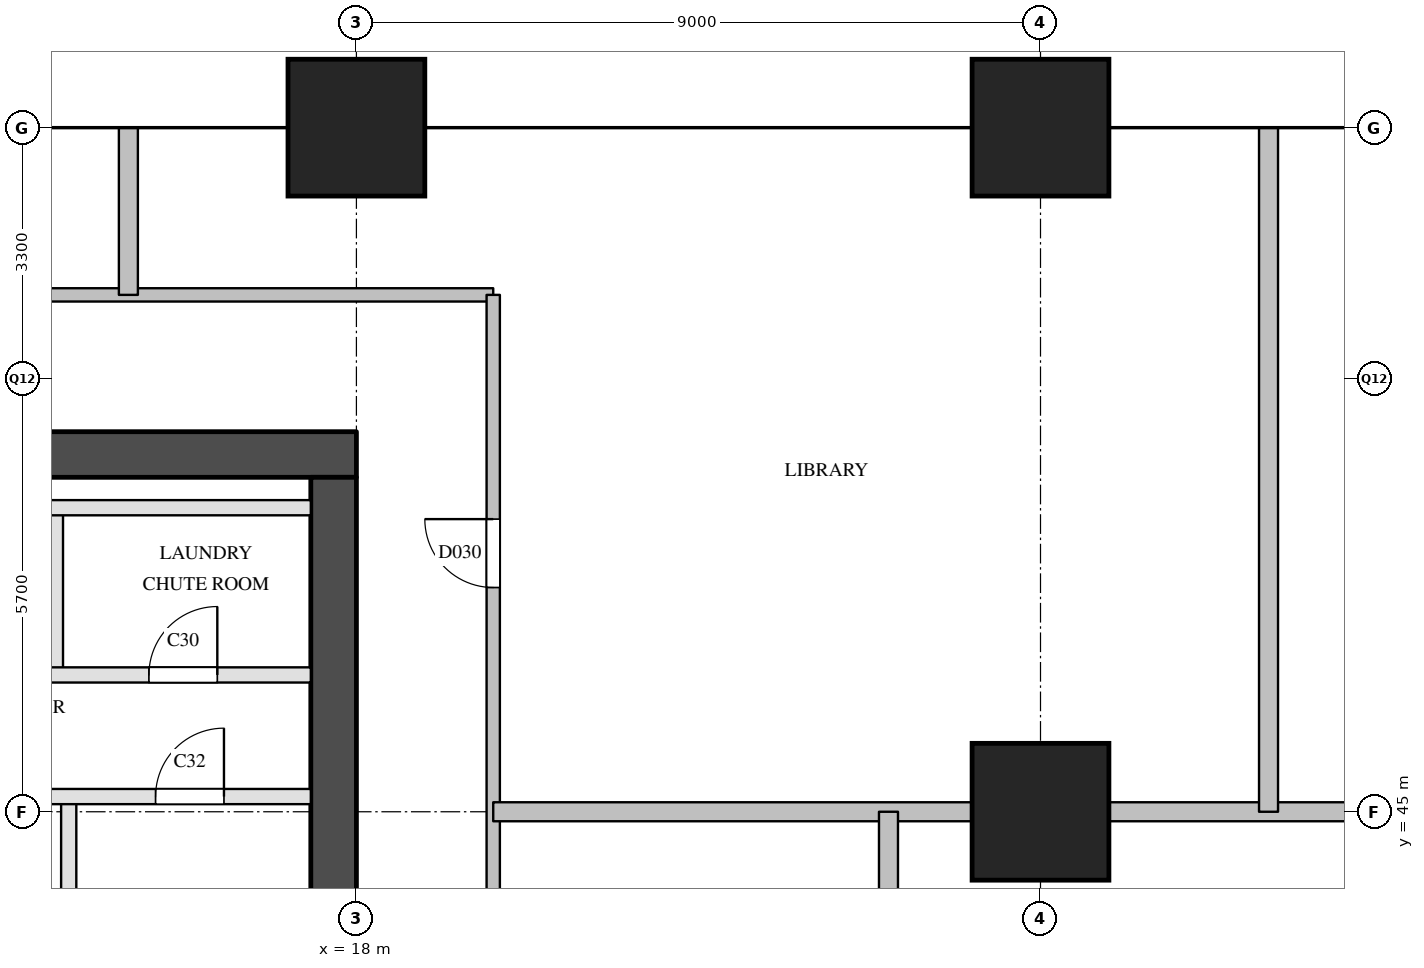
"""IFC4 building model, lengths in metres.
Left out: names, types, materials, properties, quantities, classifications, styles, units other than length and angle.
Written with IfcOpenShell. Run it as: python <this file> out.ifc"""

import sys

from ifc_helpers import new_model, si_unit, direction, frame, frame_2d, origin, origin_2d, place, context, subcontext, project, spatial, rectangle, extrude, element, fill, save


model = new_model("IFC4")
c1 = context("Model", 3, precision=1e-05, world=origin(), true_north=direction((0.0, 1.0)))
c2 = subcontext(c1, "Body", "Model", "MODEL_VIEW")
j1 = project(units=[si_unit("LENGTHUNIT", "METRE"), si_unit("PLANEANGLEUNIT", "RADIAN")], contexts=[c1])
p1 = place(None, origin())
s1 = spatial("IfcSite", under=j1, at=p1, CompositionType="ELEMENT")
p2 = place(p1, origin())
s2 = spatial("IfcBuilding", under=s1, at=p2, CompositionType="ELEMENT")
p3 = place(p2, frame((0.0, 0.0, 119.6)))
s3 = spatial("IfcBuildingStorey", under=s2, at=p3, CompositionType="ELEMENT", Elevation=119.6)
for number, where, z_axis, x_axis in (
    (1, (18.0, 54.0, 0.0), (0.0, 0.0, 1.0), (1.0, 0.0, 0.0)),
    (2, (27.0, 45.0, 0.0), (0.0, 0.0, 1.0), (1.0, 0.0, 0.0)),
    (3, (27.0, 54.0, 0.0), (0.0, 0.0, 1.0), (1.0, 0.0, 0.0)),
):
    element("IfcColumn", number, at=place(p3, frame(where, z_axis=z_axis, x_axis=x_axis)), inside=s3, PredefinedType="COLUMN", context=c2, shape_type="SweptSolid", body=[
        extrude(rectangle(XDim=1.8, YDim=1.8, at=origin_2d()), origin(), (0.0, 0.0, 1.0), 3.8),
    ])
p4 = place(p3, frame((5.6, 49.7, 0.0), z_axis=(0.0, 0.0, 1.0), x_axis=(1.0, 0.0, 0.0)))
e4 = element("IfcWall", 4, at=p4, inside=s3, PredefinedType="SHEAR", context=c2, shape_type="SweptSolid", body=[
    extrude(rectangle(XDim=12.4, YDim=0.6, at=frame_2d((6.2, 0.0))), origin(), (0.0, 0.0, 1.0), 3.3),
])
p5 = place(p3, frame((17.7, 29.1, 0.0), z_axis=(0.0, 0.0, 1.0), x_axis=(0.0, 1.0, 0.0)))
e5 = element("IfcWall", 5, at=p5, inside=s3, PredefinedType="SHEAR", context=c2, shape_type="SweptSolid", body=[
    extrude(rectangle(XDim=20.3, YDim=0.6, at=frame_2d((10.15, 0.0))), origin(), (0.0, 0.0, 1.0), 3.3),
])
p6 = place(p5, frame((1.25, 0.0, 0.0)))
e6 = element("IfcOpeningElement", 6, at=p6, cuts=e5, PredefinedType="OPENING", context=c2, shape_type="SweptSolid", body=[
    extrude(rectangle(XDim=0.7, YDim=2.1, at=frame_2d((0.35, 1.05))), frame((0.0, 0.31, 0.0), z_axis=(0.0, -1.0, 0.0), x_axis=(1.0, 0.0, 0.0)), (0.0, 0.0, 1.0), 0.62),
])
p7 = place(p5, frame((7.05, 0.0, 0.0)))
e7 = element("IfcOpeningElement", 7, at=p7, cuts=e5, PredefinedType="OPENING", context=c2, shape_type="SweptSolid", body=[
    extrude(rectangle(XDim=0.7, YDim=2.1, at=frame_2d((0.35, 1.05))), frame((0.0, 0.31, 0.0), z_axis=(0.0, -1.0, 0.0), x_axis=(1.0, 0.0, 0.0)), (0.0, 0.0, 1.0), 0.62),
])
p8 = place(p3, frame((14.04, 46.8, 0.0), z_axis=(0.0, 0.0, 1.0), x_axis=(0.0, 1.0, 0.0)))
e8 = element("IfcWall", 8, at=p8, inside=s3, PredefinedType="PARTITIONING", context=c2, shape_type="SweptSolid", body=[
    extrude(rectangle(XDim=2.2, YDim=0.2, at=frame_2d((1.1, 0.0))), origin(), (0.0, 0.0, 1.0), 3.3),
])
p9 = place(p3, frame((14.215, 39.0, 0.0), z_axis=(0.0, 0.0, 1.0), x_axis=(0.0, 1.0, 0.0)))
e9 = element("IfcWall", 9, at=p9, inside=s3, PredefinedType="PARTITIONING", context=c2, shape_type="SweptSolid", body=[
    extrude(rectangle(XDim=6.2, YDim=0.2, at=frame_2d((3.1, 0.0))), origin(), (0.0, 0.0, 1.0), 3.3),
])
p10 = place(p3, frame((12.5, 45.2, 0.0), z_axis=(0.0, 0.0, 1.0), x_axis=(1.0, 0.0, 0.0)))
e10 = element("IfcWall", 10, at=p10, inside=s3, PredefinedType="PARTITIONING", context=c2, shape_type="SweptSolid", body=[
    extrude(rectangle(XDim=4.9, YDim=0.2, at=frame_2d((2.45, 0.0))), origin(), (0.0, 0.0, 1.0), 3.3),
])
p11 = place(p10, frame((0.407, 0.0, 0.0)))
e11 = element("IfcOpeningElement", 11, at=p11, cuts=e10, PredefinedType="OPENING", context=c2, shape_type="SweptSolid", body=[
    extrude(rectangle(XDim=0.9, YDim=2.1, at=frame_2d((0.45, 1.05))), frame((0.0, 0.11, 0.0), z_axis=(0.0, -1.0, 0.0), x_axis=(1.0, 0.0, 0.0)), (0.0, 0.0, 1.0), 0.22),
])
p12 = place(p10, frame((2.857, 0.0, 0.0)))
e12 = element("IfcOpeningElement", 12, at=p12, cuts=e10, PredefinedType="OPENING", context=c2, shape_type="SweptSolid", body=[
    extrude(rectangle(XDim=0.9, YDim=2.1, at=frame_2d((0.45, 1.05))), frame((0.0, 0.11, 0.0), z_axis=(0.0, -1.0, 0.0), x_axis=(1.0, 0.0, 0.0)), (0.0, 0.0, 1.0), 0.22),
])
p13 = place(p3, frame((6.2, 46.8, 0.0), z_axis=(0.0, 0.0, 1.0), x_axis=(1.0, 0.0, 0.0)))
e13 = element("IfcWall", 13, at=p13, inside=s3, PredefinedType="PARTITIONING", context=c2, shape_type="SweptSolid", body=[
    extrude(rectangle(XDim=11.2, YDim=0.2, at=frame_2d((5.6, 0.0))), origin(), (0.0, 0.0, 1.0), 3.3),
])
p14 = place(p13, frame((0.67, 0.0, 0.0)))
e14 = element("IfcOpeningElement", 14, at=p14, cuts=e13, PredefinedType="OPENING", context=c2, shape_type="SweptSolid", body=[
    extrude(rectangle(XDim=0.9, YDim=2.1, at=frame_2d((0.45, 1.05))), frame((0.0, 0.11, 0.0), z_axis=(0.0, -1.0, 0.0), x_axis=(1.0, 0.0, 0.0)), (0.0, 0.0, 1.0), 0.22),
])
p15 = place(p13, frame((4.59, 0.0, 0.0)))
e15 = element("IfcOpeningElement", 15, at=p15, cuts=e13, PredefinedType="OPENING", context=c2, shape_type="SweptSolid", body=[
    extrude(rectangle(XDim=0.9, YDim=2.1, at=frame_2d((0.45, 1.05))), frame((0.0, 0.11, 0.0), z_axis=(0.0, -1.0, 0.0), x_axis=(1.0, 0.0, 0.0)), (0.0, 0.0, 1.0), 0.22),
])
p16 = place(p13, frame((9.07, 0.0, 0.0)))
e16 = element("IfcOpeningElement", 16, at=p16, cuts=e13, PredefinedType="OPENING", context=c2, shape_type="SweptSolid", body=[
    extrude(rectangle(XDim=0.9, YDim=2.1, at=frame_2d((0.45, 1.05))), frame((0.0, 0.11, 0.0), z_axis=(0.0, -1.0, 0.0), x_axis=(1.0, 0.0, 0.0)), (0.0, 0.0, 1.0), 0.22),
])
p17 = place(p3, frame((6.2, 49.0, 0.0), z_axis=(0.0, 0.0, 1.0), x_axis=(1.0, 0.0, 0.0)))
e17 = element("IfcWall", 17, at=p17, inside=s3, PredefinedType="PARTITIONING", context=c2, shape_type="SweptSolid", body=[
    extrude(rectangle(XDim=11.2, YDim=0.2, at=frame_2d((5.6, 0.0))), origin(), (0.0, 0.0, 1.0), 3.3),
])
p18 = place(p3, frame((3.8, 51.8, 0.0), z_axis=(0.0, 0.0, 1.0), x_axis=(1.0, 0.0, 0.0)))
e18 = element("IfcWall", 18, at=p18, inside=s3, PredefinedType="PARTITIONING", context=c2, shape_type="SweptSolid", body=[
    extrude(rectangle(XDim=16.0, YDim=0.175, at=frame_2d((8.0, 0.0))), origin(), (0.0, 0.0, 1.0), 3.3),
])
p19 = place(p18, frame((7.587, 0.0, 0.0)))
e19 = element("IfcOpeningElement", 19, at=p19, cuts=e18, PredefinedType="OPENING", context=c2, shape_type="SweptSolid", body=[
    extrude(rectangle(XDim=0.9, YDim=2.1, at=frame_2d((0.45, 1.05))), frame((0.0, 0.097, 0.0), z_axis=(0.0, -1.0, 0.0), x_axis=(1.0, 0.0, 0.0)), (0.0, 0.0, 1.0), 0.195),
])
p20 = place(p3, frame((19.8, 40.9, 0.0), z_axis=(0.0, 0.0, 1.0), x_axis=(0.0, 1.0, 0.0)))
e20 = element("IfcWall", 20, at=p20, inside=s3, PredefinedType="PARTITIONING", context=c2, shape_type="SweptSolid", body=[
    extrude(rectangle(XDim=10.9, YDim=0.175, at=frame_2d((5.45, 0.0))), origin(), (0.0, 0.0, 1.0), 3.3),
])
p21 = place(p20, frame((7.05, 0.0, 0.0)))
e21 = element("IfcOpeningElement", 21, at=p21, cuts=e20, PredefinedType="OPENING", context=c2, shape_type="SweptSolid", body=[
    extrude(rectangle(XDim=0.9, YDim=2.1, at=frame_2d((0.45, 1.05))), frame((0.0, 0.097, 0.0), z_axis=(0.0, -1.0, 0.0), x_axis=(1.0, 0.0, 0.0)), (0.0, 0.0, 1.0), 0.195),
])
p22 = place(p3, frame((19.8, 45.0, 0.0), z_axis=(0.0, 0.0, 1.0), x_axis=(1.0, 0.0, 0.0)))
e22 = element("IfcWall", 22, at=p22, inside=s3, PredefinedType="PARTITIONING", context=c2, shape_type="SweptSolid", body=[
    extrude(rectangle(XDim=14.4, YDim=0.25, at=frame_2d((7.2, 0.0))), origin(), (0.0, 0.0, 1.0), 3.3),
])
p23 = place(p3, frame((15.0, 51.8, 0.0), z_axis=(0.0, 0.0, 1.0), x_axis=(0.0, 1.0, 0.0)))
e23 = element("IfcWall", 23, at=p23, inside=s3, PredefinedType="PARTITIONING", context=c2, shape_type="SweptSolid", body=[
    extrude(rectangle(XDim=2.2, YDim=0.25, at=frame_2d((1.1, 0.0))), origin(), (0.0, 0.0, 1.0), 2.3),
])
p24 = place(p3, frame((25.0, 40.9, 0.0), z_axis=(0.0, 0.0, 1.0), x_axis=(0.0, 1.0, 0.0)))
e24 = element("IfcWall", 24, at=p24, inside=s3, PredefinedType="PARTITIONING", context=c2, shape_type="SweptSolid", body=[
    extrude(rectangle(XDim=4.1, YDim=0.25, at=frame_2d((2.05, 0.0))), origin(), (0.0, 0.0, 1.0), 3.3),
])
p25 = place(p3, frame((30.0, 45.0, 0.0), z_axis=(0.0, 0.0, 1.0), x_axis=(0.0, 1.0, 0.0)))
e25 = element("IfcWall", 25, at=p25, inside=s3, PredefinedType="PARTITIONING", context=c2, shape_type="SweptSolid", body=[
    extrude(rectangle(XDim=9.0, YDim=0.25, at=frame_2d((4.5, 0.0))), origin(), (0.0, 0.0, 1.0), 2.3),
])
p26 = place(p16, origin())
e26 = element("IfcDoor", 26, at=p26, inside=s3, OperationType="SINGLE_SWING_RIGHT", PredefinedType="DOOR", context=c2, shape_type="SweptSolid", body=[
    extrude(rectangle(XDim=0.9, YDim=2.1, at=frame_2d((0.45, 1.05))), frame((0.0, 0.025, 0.0), z_axis=(0.0, -1.0, 0.0), x_axis=(1.0, 0.0, 0.0)), (0.0, 0.0, 1.0), 0.05),
])
fill(e16, e26)
p27 = place(p12, origin())
e27 = element("IfcDoor", 27, at=p27, inside=s3, OperationType="SINGLE_SWING_RIGHT", PredefinedType="DOOR", context=c2, shape_type="SweptSolid", body=[
    extrude(rectangle(XDim=0.9, YDim=2.1, at=frame_2d((0.45, 1.05))), frame((0.0, 0.025, 0.0), z_axis=(0.0, -1.0, 0.0), x_axis=(1.0, 0.0, 0.0)), (0.0, 0.0, 1.0), 0.05),
])
fill(e12, e27)
p28 = place(p21, origin())
e28 = element("IfcDoor", 28, at=p28, inside=s3, OperationType="SINGLE_SWING_RIGHT", PredefinedType="DOOR", context=c2, shape_type="SweptSolid", body=[
    extrude(rectangle(XDim=0.9, YDim=2.1, at=frame_2d((0.45, 1.05))), frame((0.0, 0.025, 0.0), z_axis=(0.0, -1.0, 0.0), x_axis=(1.0, 0.0, 0.0)), (0.0, 0.0, 1.0), 0.05),
])
fill(e21, e28)
save(model, sys.argv[1])
